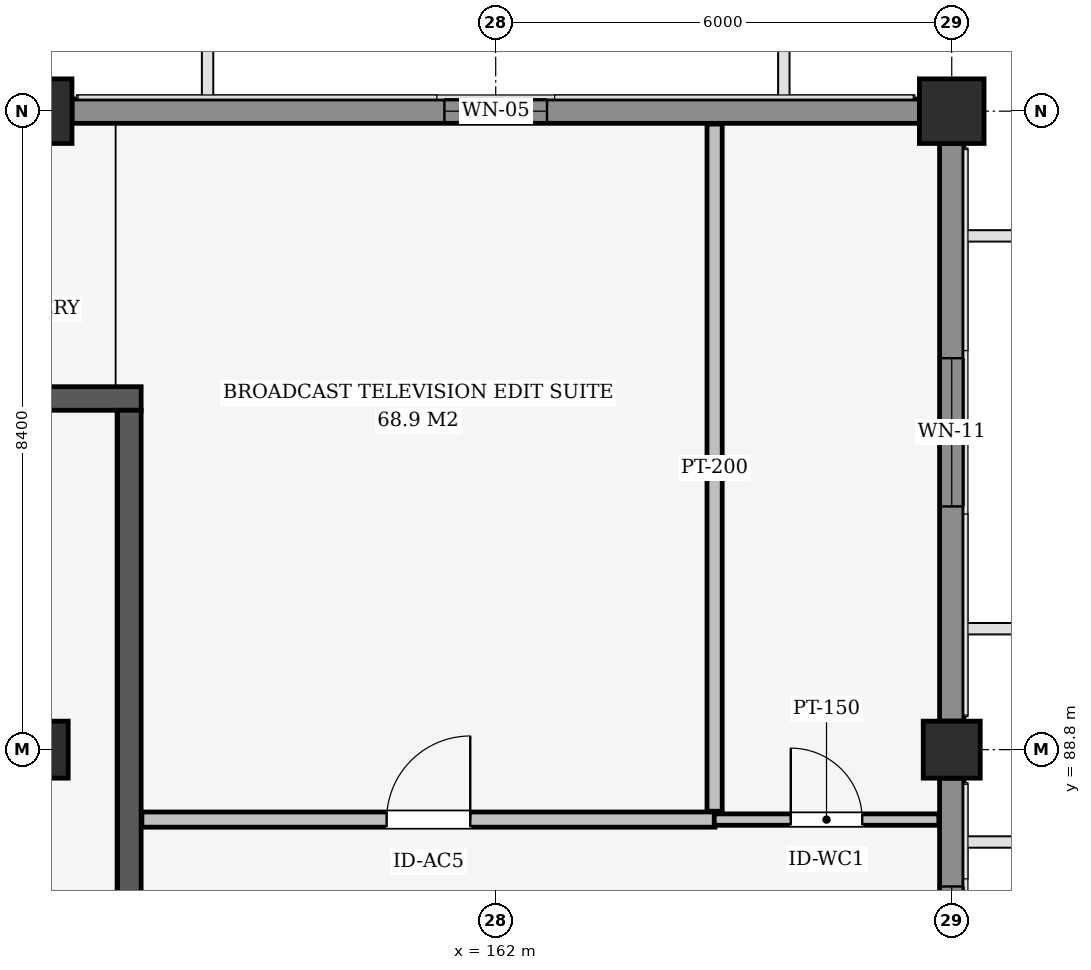
"""IFC4 building model, lengths in metres.
Left out: names, types, materials, properties, quantities, classifications, styles, units other than length and angle.
Written with IfcOpenShell. Run it as: python <this file> out.ifc"""

import sys

from ifc_helpers import new_model, si_unit, direction, frame, frame_2d, origin, origin_2d, place, context, subcontext, project, spatial, rectangle, extrude, element, fill, save


model = new_model("IFC4")
c1 = context("Model", 3, precision=1e-05, world=origin(), true_north=direction((0.0, 1.0)))
c2 = subcontext(c1, "Body", "Model", "MODEL_VIEW")
j1 = project(units=[si_unit("LENGTHUNIT", "METRE"), si_unit("PLANEANGLEUNIT", "RADIAN")], contexts=[c1])
p1 = place(None, origin())
s1 = spatial("IfcSite", under=j1, at=p1, CompositionType="ELEMENT")
p2 = place(p1, origin())
s2 = spatial("IfcBuilding", under=s1, at=p2, CompositionType="ELEMENT")
p3 = place(p2, frame((0.0, 0.0, 9.3)))
s3 = spatial("IfcBuildingStorey", under=s2, at=p3, CompositionType="ELEMENT", Elevation=9.3)
p4 = place(p3, frame((156.0, 88.8, 0.0), z_axis=(0.0, 0.0, 1.0), x_axis=(1.0, 0.0, 0.0)))
e1 = element("IfcColumn", 1, at=p4, inside=s3, PredefinedType="COLUMN", context=c2, shape_type="SweptSolid", body=[
    extrude(rectangle(XDim=0.75, YDim=0.75, at=origin_2d()), origin(), (0.0, 0.0, 1.0), 4.5),
])
p5 = place(p3, frame((156.0, 97.2, 0.0), z_axis=(0.0, 0.0, 1.0), x_axis=(1.0, 0.0, 0.0)))
e2 = element("IfcColumn", 2, at=p5, inside=s3, PredefinedType="COLUMN", context=c2, shape_type="SweptSolid", body=[
    extrude(rectangle(XDim=0.85, YDim=0.85, at=origin_2d()), origin(), (0.0, 0.0, 1.0), 4.5),
])
p6 = place(p3, frame((168.0, 88.8, 0.0), z_axis=(0.0, 0.0, 1.0), x_axis=(1.0, 0.0, 0.0)))
e3 = element("IfcColumn", 3, at=p6, inside=s3, PredefinedType="COLUMN", context=c2, shape_type="SweptSolid", body=[
    extrude(rectangle(XDim=0.75, YDim=0.75, at=origin_2d()), origin(), (0.0, 0.0, 1.0), 4.5),
])
p7 = place(p3, frame((168.0, 97.2, 0.0), z_axis=(0.0, 0.0, 1.0), x_axis=(1.0, 0.0, 0.0)))
e4 = element("IfcColumn", 4, at=p7, inside=s3, PredefinedType="COLUMN", context=c2, shape_type="SweptSolid", body=[
    extrude(rectangle(XDim=0.85, YDim=0.85, at=origin_2d()), origin(), (0.0, 0.0, 1.0), 4.5),
])
p8 = place(p3, frame((144.665, 93.42, 0.0), z_axis=(0.0, 0.0, 1.0), x_axis=(1.0, 0.0, 0.0)))
e5 = element("IfcWall", 5, at=p8, inside=s3, PredefinedType="SHEAR", context=c2, shape_type="SweptSolid", body=[
    extrude(rectangle(XDim=12.67, YDim=0.31, at=frame_2d((6.335, 0.0))), origin(), (0.0, 0.0, 1.0), 4.22),
])
p9 = place(p3, frame((157.18, 77.375, 0.0), z_axis=(0.0, 0.0, 1.0), x_axis=(0.0, 1.0, 0.0)))
e6 = element("IfcWall", 6, at=p9, inside=s3, PredefinedType="SHEAR", context=c2, shape_type="SweptSolid", body=[
    extrude(rectangle(XDim=15.89, YDim=0.31, at=frame_2d((7.945, 0.0))), origin(), (0.0, 0.0, 1.0), 4.22),
])
p10 = place(p3, frame((156.425, 97.2, 0.0), z_axis=(0.0, 0.0, 1.0), x_axis=(1.0, 0.0, 0.0)))
e7 = element("IfcWall", 7, at=p10, inside=s3, PredefinedType="SOLIDWALL", context=c2, shape_type="SweptSolid", body=[
    extrude(rectangle(XDim=11.15, YDim=0.32, at=frame_2d((5.575, 0.0))), origin(), (0.0, 0.0, 1.0), 3.664),
])
p11 = place(p10, frame((4.9, 0.0, 0.85)))
e8 = element("IfcOpeningElement", 8, at=p11, cuts=e7, PredefinedType="OPENING", context=c2, shape_type="SweptSolid", body=[
    extrude(rectangle(XDim=1.35, YDim=1.5, at=frame_2d((0.675, 0.75))), frame((0.0, 0.17, 0.0), z_axis=(0.0, -1.0, 0.0), x_axis=(1.0, 0.0, 0.0)), (0.0, 0.0, 1.0), 0.34),
])
p12 = place(p3, frame((168.0, 88.425, 0.0), z_axis=(0.0, 0.0, 1.0), x_axis=(0.0, -1.0, 0.0)))
e9 = element("IfcWall", 9, at=p12, inside=s3, PredefinedType="SOLIDWALL", context=c2, shape_type="SweptSolid", body=[
    extrude(rectangle(XDim=5.25, YDim=0.32, at=frame_2d((2.625, 0.0))), origin(), (0.0, 0.0, 1.0), 3.588),
])
p13 = place(p12, frame((1.425, 0.0, 0.85)))
e10 = element("IfcOpeningElement", 10, at=p13, cuts=e9, PredefinedType="OPENING", context=c2, shape_type="SweptSolid", body=[
    extrude(rectangle(XDim=2.4, YDim=0.95, at=frame_2d((1.2, 0.475))), frame((0.0, 0.17, 0.0), z_axis=(0.0, -1.0, 0.0), x_axis=(1.0, 0.0, 0.0)), (0.0, 0.0, 1.0), 0.34),
])
p14 = place(p3, frame((168.0, 96.775, 0.0), z_axis=(0.0, 0.0, 1.0), x_axis=(0.0, -1.0, 0.0)))
e11 = element("IfcWall", 11, at=p14, inside=s3, PredefinedType="SOLIDWALL", context=c2, shape_type="SweptSolid", body=[
    extrude(rectangle(XDim=7.6, YDim=0.32, at=frame_2d((3.8, 0.0))), origin(), (0.0, 0.0, 1.0), 3.588),
])
p15 = place(p14, frame((2.825, 0.0, 0.85)))
e12 = element("IfcOpeningElement", 12, at=p15, cuts=e11, PredefinedType="OPENING", context=c2, shape_type="SweptSolid", body=[
    extrude(rectangle(XDim=1.95, YDim=1.75, at=frame_2d((0.975, 0.875))), frame((0.0, 0.17, 0.0), z_axis=(0.0, -1.0, 0.0), x_axis=(1.0, 0.0, 0.0)), (0.0, 0.0, 1.0), 0.34),
])
p16 = place(p3, frame((157.345, 87.88, 0.0), z_axis=(0.0, 0.0, 1.0), x_axis=(1.0, 0.0, 0.0)))
e13 = element("IfcWall", 13, at=p16, inside=s3, PredefinedType="PARTITIONING", context=c2, shape_type="SweptSolid", body=[
    extrude(rectangle(XDim=7.54, YDim=0.2, at=frame_2d((3.77, 0.0))), origin(), (0.0, 0.0, 1.0), 4.2),
])
p17 = place(p16, frame((3.22, 0.0, 0.0)))
e14 = element("IfcOpeningElement", 14, at=p17, cuts=e13, PredefinedType="OPENING", context=c2, shape_type="SweptSolid", body=[
    extrude(rectangle(XDim=1.1, YDim=2.26, at=frame_2d((0.55, 1.13))), frame((0.0, 0.11, 0.0), z_axis=(0.0, -1.0, 0.0), x_axis=(1.0, 0.0, 0.0)), (0.0, 0.0, 1.0), 0.22),
])
p18 = place(p3, frame((164.875, 87.88, 0.0), z_axis=(0.0, 0.0, 1.0), x_axis=(1.0, 0.0, 0.0)))
e15 = element("IfcWall", 15, at=p18, inside=s3, PredefinedType="PARTITIONING", context=c2, shape_type="SweptSolid", body=[
    extrude(rectangle(XDim=2.955, YDim=0.15, at=frame_2d((1.478, 0.0))), origin(), (0.0, 0.0, 1.0), 4.2),
])
p19 = place(p18, frame((1.008, 0.0, 0.0)))
e16 = element("IfcOpeningElement", 16, at=p19, cuts=e15, PredefinedType="OPENING", context=c2, shape_type="SweptSolid", body=[
    extrude(rectangle(XDim=0.94, YDim=2.1, at=frame_2d((0.47, 1.05))), frame((0.0, 0.085, 0.0), z_axis=(0.0, -1.0, 0.0), x_axis=(1.0, 0.0, 0.0)), (0.0, 0.0, 1.0), 0.17),
])
p20 = place(p3, frame((164.88, 87.99, 0.0), z_axis=(0.0, 0.0, 1.0), x_axis=(0.0, 1.0, 0.0)))
e17 = element("IfcWall", 17, at=p20, inside=s3, PredefinedType="PARTITIONING", context=c2, shape_type="SweptSolid", body=[
    extrude(rectangle(XDim=9.04, YDim=0.2, at=frame_2d((4.52, 0.0))), origin(), (0.0, 0.0, 1.0), 3.743),
])
p21 = place(p11, origin())
e18 = element("IfcWindow", 18, at=p21, inside=s3, PartitioningType="SINGLE_PANEL", PredefinedType="WINDOW", context=c2, shape_type="SweptSolid", body=[
    extrude(rectangle(XDim=1.35, YDim=1.5, at=frame_2d((0.675, 0.75))), frame((0.0, 0.03, 0.0), z_axis=(0.0, -1.0, 0.0), x_axis=(1.0, 0.0, 0.0)), (0.0, 0.0, 1.0), 0.06),
])
fill(e8, e18)
p22 = place(p13, origin())
e19 = element("IfcWindow", 19, at=p22, inside=s3, PartitioningType="SINGLE_PANEL", PredefinedType="WINDOW", context=c2, shape_type="SweptSolid", body=[
    extrude(rectangle(XDim=2.4, YDim=0.95, at=frame_2d((1.2, 0.475))), frame((0.0, 0.03, 0.0), z_axis=(0.0, -1.0, 0.0), x_axis=(1.0, 0.0, 0.0)), (0.0, 0.0, 1.0), 0.06),
])
fill(e10, e19)
p23 = place(p15, origin())
e20 = element("IfcWindow", 20, at=p23, inside=s3, PartitioningType="SINGLE_PANEL", PredefinedType="WINDOW", context=c2, shape_type="SweptSolid", body=[
    extrude(rectangle(XDim=1.95, YDim=1.75, at=frame_2d((0.975, 0.875))), frame((0.0, 0.03, 0.0), z_axis=(0.0, -1.0, 0.0), x_axis=(1.0, 0.0, 0.0)), (0.0, 0.0, 1.0), 0.06),
])
fill(e12, e20)
p24 = place(p17, origin())
e21 = element("IfcDoor", 21, at=p24, inside=s3, OperationType="SINGLE_SWING_RIGHT", PredefinedType="DOOR", context=c2, shape_type="SweptSolid", body=[
    extrude(rectangle(XDim=1.1, YDim=2.26, at=frame_2d((0.55, 1.13))), frame((0.0, 0.025, 0.0), z_axis=(0.0, -1.0, 0.0), x_axis=(1.0, 0.0, 0.0)), (0.0, 0.0, 1.0), 0.05),
])
fill(e14, e21)
p25 = place(p19, origin())
e22 = element("IfcDoor", 22, at=p25, inside=s3, OperationType="SINGLE_SWING_LEFT", PredefinedType="DOOR", context=c2, shape_type="SweptSolid", body=[
    extrude(rectangle(XDim=0.94, YDim=2.1, at=frame_2d((0.47, 1.05))), frame((0.0, 0.025, 0.0), z_axis=(0.0, -1.0, 0.0), x_axis=(1.0, 0.0, 0.0)), (0.0, 0.0, 1.0), 0.05),
])
fill(e16, e22)
save(model, sys.argv[1])
